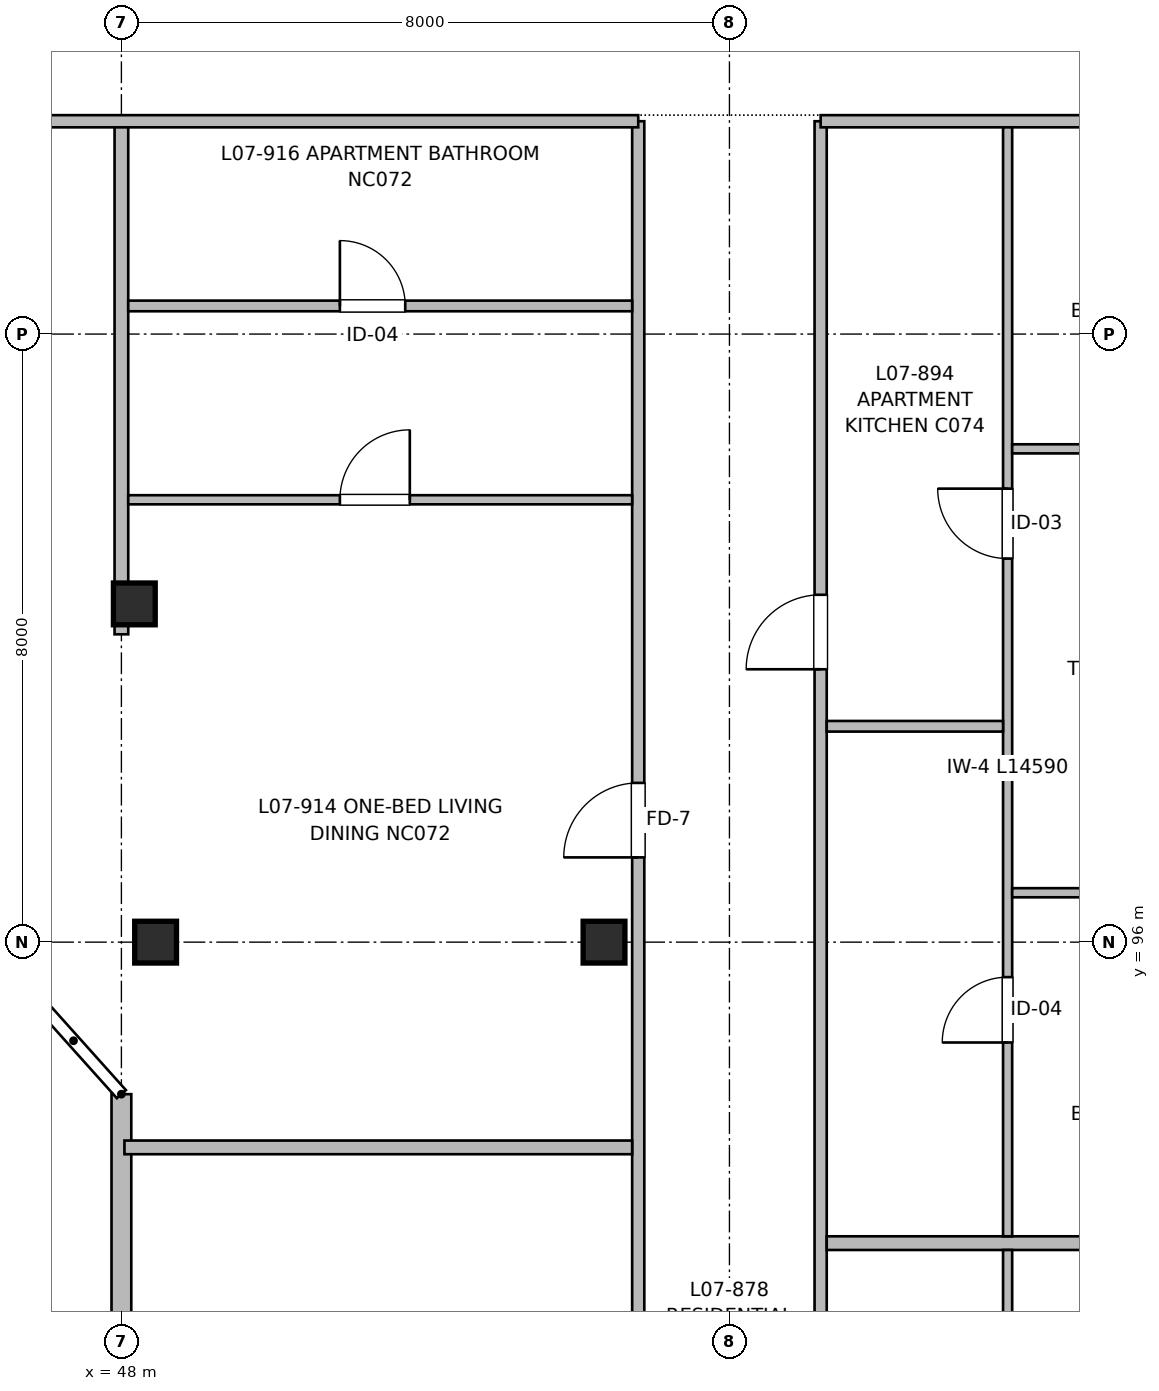
"""IFC4 building model, lengths in metres.
Left out: names, types, materials, properties, quantities, classifications, styles, units other than length and angle.
Written with IfcOpenShell. Run it as: python <this file> out.ifc"""

import sys

from ifc_helpers import new_model, si_unit, direction, frame, frame_2d, origin, origin_2d, place, context, subcontext, project, spatial, rectangle, extrude, element, fill, save


model = new_model("IFC4")
c1 = context("Model", 3, precision=1e-05, world=origin(), true_north=direction((0.0, 1.0)))
c2 = subcontext(c1, "Body", "Model", "MODEL_VIEW")
j1 = project(units=[si_unit("LENGTHUNIT", "METRE"), si_unit("PLANEANGLEUNIT", "RADIAN")], contexts=[c1])
p1 = place(None, origin())
s1 = spatial("IfcSite", under=j1, at=p1, CompositionType="ELEMENT")
p2 = place(p1, origin())
s2 = spatial("IfcBuilding", under=s1, at=p2, CompositionType="ELEMENT")
p3 = place(p2, frame((0.0, 0.0, 23.36)))
s3 = spatial("IfcBuildingStorey", under=s2, at=p3, CompositionType="ELEMENT", Elevation=23.36)
for number, where, z_axis, x_axis in (
    (1, (48.17, 100.45, 0.0), (0.0, 0.0, 1.0), (1.0, 0.0, 0.0)),
    (2, (48.45, 96.0, 0.0), (0.0, 0.0, 1.0), (1.0, 0.0, 0.0)),
    (3, (54.35, 96.0, 0.0), (0.0, 0.0, 1.0), (1.0, 0.0, 0.0)),
):
    element("IfcColumn", number, at=place(p3, frame(where, z_axis=z_axis, x_axis=x_axis)), inside=s3, PredefinedType="COLUMN", context=c2, shape_type="SweptSolid", body=[
        extrude(rectangle(XDim=0.55, YDim=0.55, at=origin_2d()), origin(), (0.0, 0.0, 1.0), 3.2),
    ])
p4 = place(p3, frame((48.0, 59.2, 0.0), z_axis=(0.0, 0.0, 1.0), x_axis=(0.0, 1.0, 0.0)))
e4 = element("IfcWall", 4, at=p4, inside=s3, PredefinedType="SOLIDWALL", context=c2, shape_type="SweptSolid", body=[
    extrude(rectangle(XDim=34.8, YDim=0.26, at=frame_2d((17.4, 0.0))), origin(), (0.0, 0.0, 1.0), 2.98),
])
p5 = place(p4, frame((2.95, 0.0, 0.0)))
e5 = element("IfcOpeningElement", 5, at=p5, cuts=e4, PredefinedType="OPENING", context=c2, shape_type="SweptSolid", body=[
    extrude(rectangle(XDim=1.2, YDim=2.2, at=frame_2d((0.6, 1.1))), frame((0.0, 0.14, 0.0), z_axis=(0.0, -1.0, 0.0), x_axis=(1.0, 0.0, 0.0)), (0.0, 0.0, 1.0), 0.28),
])
p6 = place(p4, frame((5.65, 0.0, 0.82)))
e6 = element("IfcOpeningElement", 6, at=p6, cuts=e4, PredefinedType="OPENING", context=c2, shape_type="SweptSolid", body=[
    extrude(rectangle(XDim=1.5, YDim=1.4, at=frame_2d((0.75, 0.7))), frame((0.0, 0.14, 0.0), z_axis=(0.0, -1.0, 0.0), x_axis=(1.0, 0.0, 0.0)), (0.0, 0.0, 1.0), 0.28),
])
p7 = place(p4, frame((12.075, 0.0, 0.72)))
e7 = element("IfcOpeningElement", 7, at=p7, cuts=e4, PredefinedType="OPENING", context=c2, shape_type="SweptSolid", body=[
    extrude(rectangle(XDim=1.95, YDim=1.5, at=frame_2d((0.975, 0.75))), frame((0.0, 0.14, 0.0), z_axis=(0.0, -1.0, 0.0), x_axis=(1.0, 0.0, 0.0)), (0.0, 0.0, 1.0), 0.28),
])
p8 = place(p4, frame((29.61, 0.0, 0.72)))
e8 = element("IfcOpeningElement", 8, at=p8, cuts=e4, PredefinedType="OPENING", context=c2, shape_type="SweptSolid", body=[
    extrude(rectangle(XDim=1.68, YDim=1.5, at=frame_2d((0.84, 0.75))), frame((0.0, 0.14, 0.0), z_axis=(0.0, -1.0, 0.0), x_axis=(1.0, 0.0, 0.0)), (0.0, 0.0, 1.0), 0.28),
])
p9 = place(p3, frame((54.8, 59.36, 0.0), z_axis=(0.0, 0.0, 1.0), x_axis=(0.0, 1.0, 0.0)))
e9 = element("IfcWall", 9, at=p9, inside=s3, PredefinedType="PARTITIONING", context=c2, shape_type="SweptSolid", body=[
    extrude(rectangle(XDim=47.44, YDim=0.16, at=frame_2d((23.72, 0.0))), origin(), (0.0, 0.0, 1.0), 2.935),
])
p10 = place(p9, frame((9.64, 0.0, 0.0)))
e10 = element("IfcOpeningElement", 10, at=p10, cuts=e9, PredefinedType="OPENING", context=c2, shape_type="SweptSolid", body=[
    extrude(rectangle(XDim=1.1, YDim=2.15, at=frame_2d((0.55, 1.075))), frame((0.0, 0.09, 0.0), z_axis=(0.0, -1.0, 0.0), x_axis=(1.0, 0.0, 0.0)), (0.0, 0.0, 1.0), 0.18),
])
p11 = place(p9, frame((16.04, 0.0, 0.0)))
e11 = element("IfcOpeningElement", 11, at=p11, cuts=e9, PredefinedType="OPENING", context=c2, shape_type="SweptSolid", body=[
    extrude(rectangle(XDim=1.6, YDim=2.15, at=frame_2d((0.8, 1.075))), frame((0.0, 0.09, 0.0), z_axis=(0.0, -1.0, 0.0), x_axis=(1.0, 0.0, 0.0)), (0.0, 0.0, 1.0), 0.18),
])
p12 = place(p9, frame((1.8, 0.0, 0.0)))
e12 = element("IfcOpeningElement", 12, at=p12, cuts=e9, PredefinedType="OPENING", context=c2, shape_type="SweptSolid", body=[
    extrude(rectangle(XDim=0.96, YDim=2.15, at=frame_2d((0.48, 1.075))), frame((0.0, 0.09, 0.0), z_axis=(0.0, -1.0, 0.0), x_axis=(1.0, 0.0, 0.0)), (0.0, 0.0, 1.0), 0.18),
])
p13 = place(p9, frame((29.545, 0.0, 0.0)))
e13 = element("IfcOpeningElement", 13, at=p13, cuts=e9, PredefinedType="OPENING", context=c2, shape_type="SweptSolid", body=[
    extrude(rectangle(XDim=0.98, YDim=2.15, at=frame_2d((0.49, 1.075))), frame((0.0, 0.09, 0.0), z_axis=(0.0, -1.0, 0.0), x_axis=(1.0, 0.0, 0.0)), (0.0, 0.0, 1.0), 0.18),
])
p14 = place(p9, frame((37.755, 0.0, 0.0)))
e14 = element("IfcOpeningElement", 14, at=p14, cuts=e9, PredefinedType="OPENING", context=c2, shape_type="SweptSolid", body=[
    extrude(rectangle(XDim=0.98, YDim=2.15, at=frame_2d((0.49, 1.075))), frame((0.0, 0.09, 0.0), z_axis=(0.0, -1.0, 0.0), x_axis=(1.0, 0.0, 0.0)), (0.0, 0.0, 1.0), 0.18),
])
p15 = place(p3, frame((57.2, 59.36, 0.0), z_axis=(0.0, 0.0, 1.0), x_axis=(0.0, 1.0, 0.0)))
e15 = element("IfcWall", 15, at=p15, inside=s3, PredefinedType="PARTITIONING", context=c2, shape_type="SweptSolid", body=[
    extrude(rectangle(XDim=47.44, YDim=0.16, at=frame_2d((23.72, 0.0))), origin(), (0.0, 0.0, 1.0), 2.935),
])
p16 = place(p15, frame((5.29, 0.0, 0.0)))
e16 = element("IfcOpeningElement", 16, at=p16, cuts=e15, PredefinedType="OPENING", context=c2, shape_type="SweptSolid", body=[
    extrude(rectangle(XDim=0.98, YDim=2.15, at=frame_2d((0.49, 1.075))), frame((0.0, 0.09, 0.0), z_axis=(0.0, -1.0, 0.0), x_axis=(1.0, 0.0, 0.0)), (0.0, 0.0, 1.0), 0.18),
])
p17 = place(p15, frame((15.5, 0.0, 0.0)))
e17 = element("IfcOpeningElement", 17, at=p17, cuts=e15, PredefinedType="OPENING", context=c2, shape_type="SweptSolid", body=[
    extrude(rectangle(XDim=1.02, YDim=2.15, at=frame_2d((0.51, 1.075))), frame((0.0, 0.09, 0.0), z_axis=(0.0, -1.0, 0.0), x_axis=(1.0, 0.0, 0.0)), (0.0, 0.0, 1.0), 0.18),
])
p18 = place(p15, frame((26.78, 0.0, 0.0)))
e18 = element("IfcOpeningElement", 18, at=p18, cuts=e15, PredefinedType="OPENING", context=c2, shape_type="SweptSolid", body=[
    extrude(rectangle(XDim=0.98, YDim=2.15, at=frame_2d((0.49, 1.075))), frame((0.0, 0.09, 0.0), z_axis=(0.0, -1.0, 0.0), x_axis=(1.0, 0.0, 0.0)), (0.0, 0.0, 1.0), 0.18),
])
p19 = place(p15, frame((40.23, 0.0, 0.0)))
e19 = element("IfcOpeningElement", 19, at=p19, cuts=e15, PredefinedType="OPENING", context=c2, shape_type="SweptSolid", body=[
    extrude(rectangle(XDim=0.98, YDim=2.15, at=frame_2d((0.49, 1.075))), frame((0.0, 0.09, 0.0), z_axis=(0.0, -1.0, 0.0), x_axis=(1.0, 0.0, 0.0)), (0.0, 0.0, 1.0), 0.18),
])
p20 = place(p3, frame((39.66, 106.8, 0.0), z_axis=(0.0, 0.0, 1.0), x_axis=(1.0, 0.0, 0.0)))
e20 = element("IfcWall", 20, at=p20, inside=s3, PredefinedType="PARTITIONING", context=c2, shape_type="SweptSolid", body=[
    extrude(rectangle(XDim=15.14, YDim=0.16, at=frame_2d((7.57, 0.0))), origin(), (0.0, 0.0, 1.0), 2.935),
])
p21 = place(p3, frame((57.2, 106.8, 0.0), z_axis=(0.0, 0.0, 1.0), x_axis=(1.0, 0.0, 0.0)))
e21 = element("IfcWall", 21, at=p21, inside=s3, PredefinedType="PARTITIONING", context=c2, shape_type="SweptSolid", body=[
    extrude(rectangle(XDim=24.14, YDim=0.16, at=frame_2d((12.07, 0.0))), origin(), (0.0, 0.0, 1.0), 2.935),
])
p22 = place(p21, frame((19.575, 0.0, 0.0)))
e22 = element("IfcOpeningElement", 22, at=p22, cuts=e21, PredefinedType="OPENING", context=c2, shape_type="SweptSolid", body=[
    extrude(rectangle(XDim=1.05, YDim=2.15, at=frame_2d((0.525, 1.075))), frame((0.0, 0.09, 0.0), z_axis=(0.0, -1.0, 0.0), x_axis=(1.0, 0.0, 0.0)), (0.0, 0.0, 1.0), 0.18),
])
p23 = place(p21, frame((8.995, 0.0, 0.0)))
e23 = element("IfcOpeningElement", 23, at=p23, cuts=e21, PredefinedType="OPENING", context=c2, shape_type="SweptSolid", body=[
    extrude(rectangle(XDim=0.98, YDim=2.15, at=frame_2d((0.49, 1.075))), frame((0.0, 0.09, 0.0), z_axis=(0.0, -1.0, 0.0), x_axis=(1.0, 0.0, 0.0)), (0.0, 0.0, 1.0), 0.18),
])
p24 = place(p3, frame((48.0, 100.05, 0.0), z_axis=(0.0, 0.0, 1.0), x_axis=(0.0, 1.0, 0.0)))
e24 = element("IfcWall", 24, at=p24, inside=s3, PredefinedType="PARTITIONING", context=c2, shape_type="SweptSolid", body=[
    extrude(rectangle(XDim=6.67, YDim=0.18, at=frame_2d((3.335, 0.0))), origin(), (0.0, 0.0, 1.0), 2.68),
])
p25 = place(p3, frame((57.28, 92.04, 0.0), z_axis=(0.0, 0.0, 1.0), x_axis=(1.0, 0.0, 0.0)))
e25 = element("IfcWall", 25, at=p25, inside=s3, PredefinedType="PARTITIONING", context=c2, shape_type="SweptSolid", body=[
    extrude(rectangle(XDim=9.91, YDim=0.18, at=frame_2d((4.955, 0.0))), origin(), (0.0, 0.0, 1.0), 2.935),
])
p26 = place(p3, frame((59.66, 79.81, 0.0), z_axis=(0.0, 0.0, 1.0), x_axis=(0.0, 1.0, 0.0)))
e26 = element("IfcWall", 26, at=p26, inside=s3, PredefinedType="PARTITIONING", context=c2, shape_type="SweptSolid", body=[
    extrude(rectangle(XDim=12.14, YDim=0.12, at=frame_2d((6.07, 0.0))), origin(), (0.0, 0.0, 1.0), 2.935),
])
p27 = place(p26, frame((2.12, 0.0, 0.0)))
e27 = element("IfcOpeningElement", 27, at=p27, cuts=e26, PredefinedType="OPENING", context=c2, shape_type="SweptSolid", body=[
    extrude(rectangle(XDim=0.86, YDim=2.1, at=frame_2d((0.43, 1.05))), frame((0.0, 0.07, 0.0), z_axis=(0.0, -1.0, 0.0), x_axis=(1.0, 0.0, 0.0)), (0.0, 0.0, 1.0), 0.14),
])
p28 = place(p26, frame((7.417, 0.0, 0.0)))
e28 = element("IfcOpeningElement", 28, at=p28, cuts=e26, PredefinedType="OPENING", context=c2, shape_type="SweptSolid", body=[
    extrude(rectangle(XDim=0.92, YDim=2.1, at=frame_2d((0.46, 1.05))), frame((0.0, 0.07, 0.0), z_axis=(0.0, -1.0, 0.0), x_axis=(1.0, 0.0, 0.0)), (0.0, 0.0, 1.0), 0.14),
])
p29 = place(p3, frame((59.66, 92.13, 0.0), z_axis=(0.0, 0.0, 1.0), x_axis=(0.0, 1.0, 0.0)))
e29 = element("IfcWall", 29, at=p29, inside=s3, PredefinedType="PARTITIONING", context=c2, shape_type="SweptSolid", body=[
    extrude(rectangle(XDim=14.59, YDim=0.12, at=frame_2d((7.295, 0.0))), origin(), (0.0, 0.0, 1.0), 2.935),
])
p30 = place(p29, frame((2.55, 0.0, 0.0)))
e30 = element("IfcOpeningElement", 30, at=p30, cuts=e29, PredefinedType="OPENING", context=c2, shape_type="SweptSolid", body=[
    extrude(rectangle(XDim=0.86, YDim=2.1, at=frame_2d((0.43, 1.05))), frame((0.0, 0.07, 0.0), z_axis=(0.0, -1.0, 0.0), x_axis=(1.0, 0.0, 0.0)), (0.0, 0.0, 1.0), 0.14),
])
p31 = place(p29, frame((8.917, 0.0, 0.0)))
e31 = element("IfcOpeningElement", 31, at=p31, cuts=e29, PredefinedType="OPENING", context=c2, shape_type="SweptSolid", body=[
    extrude(rectangle(XDim=0.92, YDim=2.1, at=frame_2d((0.46, 1.05))), frame((0.0, 0.07, 0.0), z_axis=(0.0, -1.0, 0.0), x_axis=(1.0, 0.0, 0.0)), (0.0, 0.0, 1.0), 0.14),
])
p32 = place(p3, frame((57.28, 98.84, 0.0), z_axis=(0.0, 0.0, 1.0), x_axis=(1.0, 0.0, 0.0)))
e32 = element("IfcWall", 32, at=p32, inside=s3, PredefinedType="PARTITIONING", context=c2, shape_type="SweptSolid", body=[
    extrude(rectangle(XDim=2.32, YDim=0.14, at=frame_2d((1.16, 0.0))), origin(), (0.0, 0.0, 1.0), 2.935),
])
p33 = place(p3, frame((59.72, 96.65, 0.0), z_axis=(0.0, 0.0, 1.0), x_axis=(1.0, 0.0, 0.0)))
e33 = element("IfcWall", 33, at=p33, inside=s3, PredefinedType="PARTITIONING", context=c2, shape_type="SweptSolid", body=[
    extrude(rectangle(XDim=12.041, YDim=0.12, at=frame_2d((6.02, 0.0))), origin(), (0.0, 0.0, 1.0), 2.935),
])
p34 = place(p33, frame((1.645, 0.0, 0.0)))
e34 = element("IfcOpeningElement", 34, at=p34, cuts=e33, PredefinedType="OPENING", context=c2, shape_type="SweptSolid", body=[
    extrude(rectangle(XDim=0.9, YDim=2.1, at=frame_2d((0.45, 1.05))), frame((0.0, 0.07, 0.0), z_axis=(0.0, -1.0, 0.0), x_axis=(1.0, 0.0, 0.0)), (0.0, 0.0, 1.0), 0.14),
])
p35 = place(p3, frame((59.72, 102.49, 0.0), z_axis=(0.0, 0.0, 1.0), x_axis=(1.0, 0.0, 0.0)))
e35 = element("IfcWall", 35, at=p35, inside=s3, PredefinedType="PARTITIONING", context=c2, shape_type="SweptSolid", body=[
    extrude(rectangle(XDim=4.19, YDim=0.12, at=frame_2d((2.095, 0.0))), origin(), (0.0, 0.0, 1.0), 2.935),
])
p36 = place(p35, frame((1.655, 0.0, 0.0)))
e36 = element("IfcOpeningElement", 36, at=p36, cuts=e35, PredefinedType="OPENING", context=c2, shape_type="SweptSolid", body=[
    extrude(rectangle(XDim=0.88, YDim=2.1, at=frame_2d((0.44, 1.05))), frame((0.0, 0.07, 0.0), z_axis=(0.0, -1.0, 0.0), x_axis=(1.0, 0.0, 0.0)), (0.0, 0.0, 1.0), 0.14),
])
p37 = place(p3, frame((48.04, 93.3, 0.0), z_axis=(0.0, 0.0, 1.0), x_axis=(1.0, 0.0, 0.0)))
e37 = element("IfcWall", 37, at=p37, inside=s3, PredefinedType="PARTITIONING", context=c2, shape_type="SweptSolid", body=[
    extrude(rectangle(XDim=6.68, YDim=0.18, at=frame_2d((3.34, 0.0))), origin(), (0.0, 0.0, 1.0), 2.935),
])
p38 = place(p3, frame((48.09, 101.82, 0.0), z_axis=(0.0, 0.0, 1.0), x_axis=(1.0, 0.0, 0.0)))
e38 = element("IfcWall", 38, at=p38, inside=s3, PredefinedType="PARTITIONING", context=c2, shape_type="SweptSolid", body=[
    extrude(rectangle(XDim=6.63, YDim=0.12, at=frame_2d((3.315, 0.0))), origin(), (0.0, 0.0, 1.0), 2.935),
])
p39 = place(p38, frame((2.785, 0.0, 0.0)))
e39 = element("IfcOpeningElement", 39, at=p39, cuts=e38, PredefinedType="OPENING", context=c2, shape_type="SweptSolid", body=[
    extrude(rectangle(XDim=0.92, YDim=2.1, at=frame_2d((0.46, 1.05))), frame((0.0, 0.07, 0.0), z_axis=(0.0, -1.0, 0.0), x_axis=(1.0, 0.0, 0.0)), (0.0, 0.0, 1.0), 0.14),
])
p40 = place(p3, frame((48.09, 104.37, 0.0), z_axis=(0.0, 0.0, 1.0), x_axis=(1.0, 0.0, 0.0)))
e40 = element("IfcWall", 40, at=p40, inside=s3, PredefinedType="PARTITIONING", context=c2, shape_type="SweptSolid", body=[
    extrude(rectangle(XDim=6.63, YDim=0.14, at=frame_2d((3.315, 0.0))), origin(), (0.0, 0.0, 1.0), 2.935),
])
p41 = place(p40, frame((2.785, 0.0, 0.0)))
e41 = element("IfcOpeningElement", 41, at=p41, cuts=e40, PredefinedType="OPENING", context=c2, shape_type="SweptSolid", body=[
    extrude(rectangle(XDim=0.86, YDim=2.1, at=frame_2d((0.43, 1.05))), frame((0.0, 0.08, 0.0), z_axis=(0.0, -1.0, 0.0), x_axis=(1.0, 0.0, 0.0)), (0.0, 0.0, 1.0), 0.16),
])
p42 = place(p30, origin())
e42 = element("IfcDoor", 42, at=p42, inside=s3, OperationType="SINGLE_SWING_LEFT", PredefinedType="DOOR", context=c2, shape_type="SweptSolid", body=[
    extrude(rectangle(XDim=0.86, YDim=2.1, at=frame_2d((0.43, 1.05))), frame((0.0, 0.025, 0.0), z_axis=(0.0, -1.0, 0.0), x_axis=(1.0, 0.0, 0.0)), (0.0, 0.0, 1.0), 0.05),
])
fill(e30, e42)
p43 = place(p31, origin())
e43 = element("IfcDoor", 43, at=p43, inside=s3, OperationType="SINGLE_SWING_RIGHT", PredefinedType="DOOR", context=c2, shape_type="SweptSolid", body=[
    extrude(rectangle(XDim=0.92, YDim=2.1, at=frame_2d((0.46, 1.05))), frame((0.0, 0.025, 0.0), z_axis=(0.0, -1.0, 0.0), x_axis=(1.0, 0.0, 0.0)), (0.0, 0.0, 1.0), 0.05),
])
fill(e31, e43)
p44 = place(p19, origin())
e44 = element("IfcDoor", 44, at=p44, inside=s3, OperationType="SINGLE_SWING_LEFT", PredefinedType="DOOR", context=c2, shape_type="SweptSolid", body=[
    extrude(rectangle(XDim=0.98, YDim=2.15, at=frame_2d((0.49, 1.075))), frame((0.0, 0.025, 0.0), z_axis=(0.0, -1.0, 0.0), x_axis=(1.0, 0.0, 0.0)), (0.0, 0.0, 1.0), 0.05),
])
fill(e19, e44)
p45 = place(p41, origin())
e45 = element("IfcDoor", 45, at=p45, inside=s3, OperationType="SINGLE_SWING_LEFT", PredefinedType="DOOR", context=c2, shape_type="SweptSolid", body=[
    extrude(rectangle(XDim=0.86, YDim=2.1, at=frame_2d((0.43, 1.05))), frame((0.0, 0.025, 0.0), z_axis=(0.0, -1.0, 0.0), x_axis=(1.0, 0.0, 0.0)), (0.0, 0.0, 1.0), 0.05),
])
fill(e41, e45)
p46 = place(p39, origin())
e46 = element("IfcDoor", 46, at=p46, inside=s3, OperationType="SINGLE_SWING_RIGHT", PredefinedType="DOOR", context=c2, shape_type="SweptSolid", body=[
    extrude(rectangle(XDim=0.92, YDim=2.1, at=frame_2d((0.46, 1.05))), frame((0.0, 0.025, 0.0), z_axis=(0.0, -1.0, 0.0), x_axis=(1.0, 0.0, 0.0)), (0.0, 0.0, 1.0), 0.05),
])
fill(e39, e46)
p47 = place(p14, origin())
e47 = element("IfcDoor", 47, at=p47, inside=s3, OperationType="SINGLE_SWING_LEFT", PredefinedType="DOOR", context=c2, shape_type="SweptSolid", body=[
    extrude(rectangle(XDim=0.98, YDim=2.15, at=frame_2d((0.49, 1.075))), frame((0.0, 0.025, 0.0), z_axis=(0.0, -1.0, 0.0), x_axis=(1.0, 0.0, 0.0)), (0.0, 0.0, 1.0), 0.05),
])
fill(e14, e47)
save(model, sys.argv[1])
